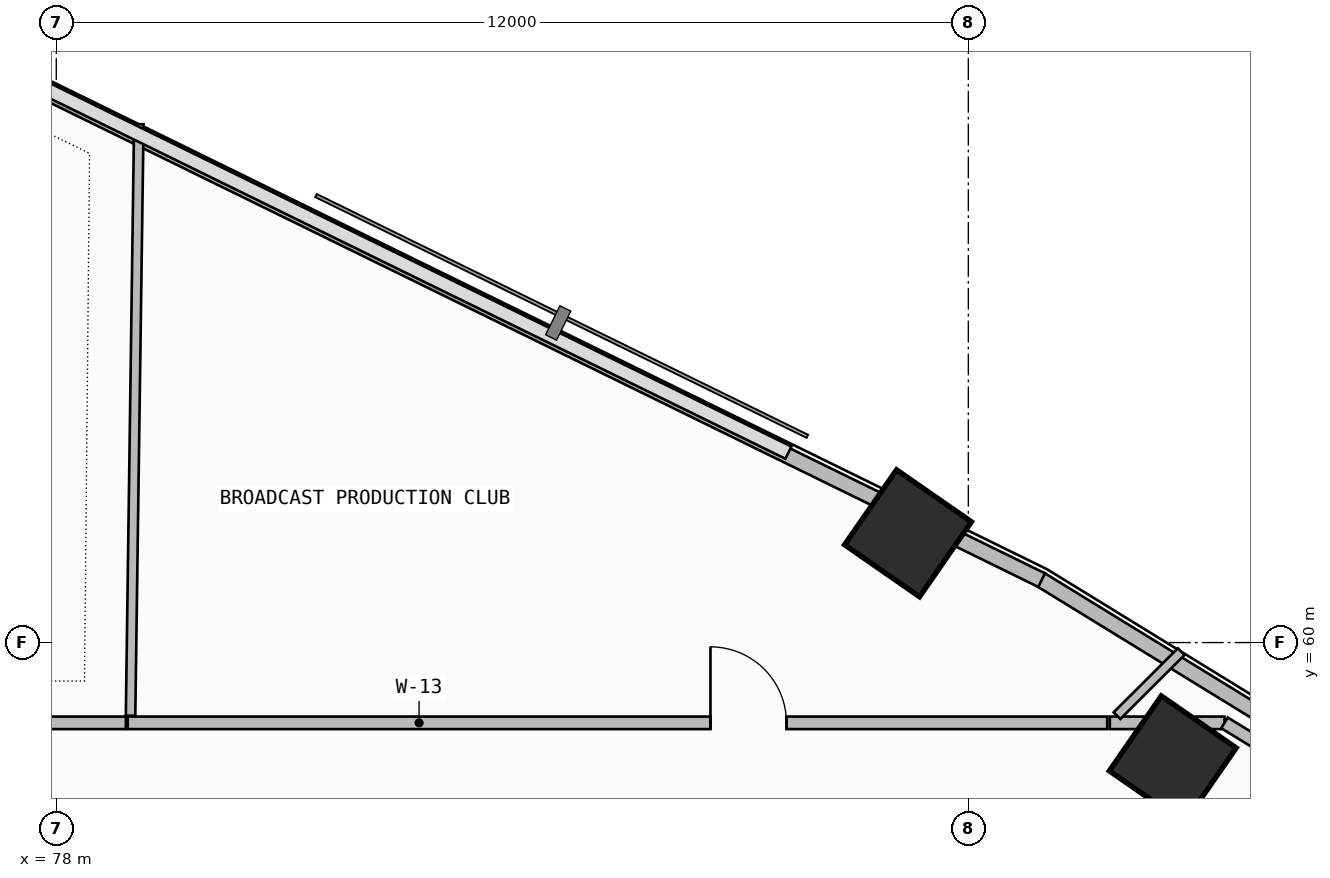
"""IFC4 building model, lengths in metres.
Left out: names, types, materials, properties, quantities, classifications, styles, units other than length and angle.
Written with IfcOpenShell. Run it as: python <this file> out.ifc"""

import sys

from ifc_helpers import new_model, si_unit, direction, frame, frame_2d, origin, origin_2d, place, context, subcontext, project, spatial, rectangle, extrude, element, fill, save


model = new_model("IFC4")
c1 = context("Model", 3, precision=1e-05, world=origin(), true_north=direction((0.0, 1.0)))
c2 = subcontext(c1, "Body", "Model", "MODEL_VIEW")
j1 = project(units=[si_unit("LENGTHUNIT", "METRE"), si_unit("PLANEANGLEUNIT", "RADIAN")], contexts=[c1])
p1 = place(None, origin())
s1 = spatial("IfcSite", under=j1, at=p1, CompositionType="ELEMENT")
p2 = place(p1, origin())
s2 = spatial("IfcBuilding", under=s1, at=p2, CompositionType="ELEMENT")
p3 = place(p2, frame((0.0, 0.0, 117.3)))
s3 = spatial("IfcBuildingStorey", under=s2, at=p3, CompositionType="ELEMENT", Elevation=117.3)
for number, where, z_axis, x_axis in (
    (1, (92.69, 58.463, 0.0), (0.0, 0.0, 1.0), (0.57, 0.822, 0.0)),
    (2, (89.207, 61.438, 0.0), (0.0, 0.0, 1.0), (0.57, 0.822, 0.0)),
):
    element("IfcColumn", number, at=place(p3, frame(where, z_axis=z_axis, x_axis=x_axis)), inside=s3, PredefinedType="COLUMN", context=c2, shape_type="SweptSolid", body=[
        extrude(rectangle(XDim=1.2, YDim=1.2, at=origin_2d()), origin(), (0.0, 0.0, 1.0), 3.6),
    ])
p4 = place(p3, frame((119.865, 43.07, 0.0), z_axis=(0.0, 0.0, 1.0), x_axis=(-0.852110824326, 0.52336138859, 0.0)))
e3 = element("IfcWall", 3, at=p4, inside=s3, PredefinedType="PARAPET", context=c2, shape_type="SweptSolid", body=[
    extrude(rectangle(XDim=33.932, YDim=0.2, at=frame_2d((16.966, 0.0))), origin(), (0.0, 0.0, 1.0), 1.15),
])
p5 = place(p3, frame((90.964, 60.822, 0.0), z_axis=(0.0, 0.0, 1.0), x_axis=(-0.898000468284, 0.439994498787, 0.0)))
e4 = element("IfcWall", 4, at=p5, inside=s3, PredefinedType="PARAPET", context=c2, shape_type="SweptSolid", body=[
    extrude(rectangle(XDim=1.423, YDim=0.2, at=frame_2d((0.712, 0.0))), origin(), (0.0, 0.0, 1.0), 1.15),
])
p6 = place(p3, frame((88.921, 61.823, 0.0), z_axis=(0.0, 0.0, 1.0), x_axis=(-0.897993533426, 0.440008652103, 0.0)))
e5 = element("IfcWall", 5, at=p6, inside=s3, PredefinedType="PARAPET", context=c2, shape_type="SweptSolid", body=[
    extrude(rectangle(XDim=26.864, YDim=0.2, at=frame_2d((13.432, 0.0))), origin(), (0.0, 0.0, 1.0), 1.15),
])
p7 = place(p3, frame((93.37, 58.944, 0.0), z_axis=(0.0, 0.0, 1.0), x_axis=(-1.0, 0.0, 0.0)))
e6 = element("IfcWall", 6, at=p7, inside=s3, PredefinedType="PARTITIONING", context=c2, shape_type="SweptSolid", body=[
    extrude(rectangle(XDim=1.509, YDim=0.165, at=frame_2d((0.754, 0.0))), origin(), (0.0, 0.0, 1.0), 2.725),
])
p8 = place(p3, frame((94.105, 58.493, 0.0), z_axis=(0.0, 0.0, 1.0), x_axis=(-0.851998403327, 0.523544382769, 0.0)))
e7 = element("IfcWall", 7, at=p8, inside=s3, PredefinedType="PARTITIONING", context=c2, shape_type="SweptSolid", body=[
    extrude(rectangle(XDim=0.862, YDim=0.165, at=frame_2d((0.431, 0.0))), origin(), (0.0, 0.0, 1.0), 3.34),
])
p9 = place(p3, frame((91.956, 59.039, 0.0), z_axis=(0.0, 0.0, 1.0), x_axis=(0.708129644878, 0.706082435729, 0.0)))
e8 = element("IfcWall", 8, at=p9, inside=s3, PredefinedType="PARTITIONING", context=c2, shape_type="SweptSolid", body=[
    extrude(rectangle(XDim=1.193, YDim=0.125, at=frame_2d((0.596, 0.0))), origin(), (0.0, 0.0, 1.0), 2.725),
])
p10 = place(p3, frame((91.828, 58.944, 0.0), z_axis=(0.0, 0.0, 1.0), x_axis=(-1.0, 0.0, 0.0)))
e9 = element("IfcWall", 9, at=p10, inside=s3, PredefinedType="PARTITIONING", context=c2, shape_type="SweptSolid", body=[
    extrude(rectangle(XDim=12.888, YDim=0.165, at=frame_2d((6.444, 0.0))), origin(), (0.0, 0.0, 1.0), 2.725),
])
p11 = place(p10, frame((4.221, 0.0, 0.0)))
e10 = element("IfcOpeningElement", 10, at=p11, cuts=e9, PredefinedType="OPENING", context=c2, shape_type="SweptSolid", body=[
    extrude(rectangle(XDim=1.0, YDim=2.2, at=frame_2d((0.5, 1.1))), frame((0.0, 0.093, 0.0), z_axis=(0.0, -1.0, 0.0), x_axis=(1.0, 0.0, 0.0)), (0.0, 0.0, 1.0), 0.185),
])
p12 = place(p3, frame((78.977, 59.039, 0.0), z_axis=(0.0, 0.0, 1.0), x_axis=(0.013992104015, 0.999902105721, 0.0)))
e11 = element("IfcWall", 11, at=p12, inside=s3, PredefinedType="PARTITIONING", context=c2, shape_type="SweptSolid", body=[
    extrude(rectangle(XDim=7.782, YDim=0.125, at=frame_2d((3.891, 0.0))), origin(), (0.0, 0.0, 1.0), 3.34),
])
p13 = place(p3, frame((78.916, 58.944, 0.0), z_axis=(0.0, 0.0, 1.0), x_axis=(-1.0, 0.0, 0.0)))
e12 = element("IfcWall", 12, at=p13, inside=s3, PredefinedType="PARTITIONING", context=c2, shape_type="SweptSolid", body=[
    extrude(rectangle(XDim=9.571, YDim=0.165, at=frame_2d((4.786, 0.0))), origin(), (0.0, 0.0, 1.0), 2.725),
])
p14 = place(p13, frame((3.06, 0.0, 0.0)))
e13 = element("IfcOpeningElement", 13, at=p14, cuts=e12, PredefinedType="OPENING", context=c2, shape_type="SweptSolid", body=[
    extrude(rectangle(XDim=1.0, YDim=2.2, at=frame_2d((0.5, 1.1))), frame((0.0, 0.093, 0.0), z_axis=(0.0, -1.0, 0.0), x_axis=(1.0, 0.0, 0.0)), (0.0, 0.0, 1.0), 0.185),
])
p15 = place(p11, frame((1.0, 0.0, 0.0), z_axis=(0.0, 0.0, 1.0), x_axis=(-1.0, 0.0, 0.0)))
e14 = element("IfcDoor", 14, at=p15, inside=s3, OperationType="SINGLE_SWING_LEFT", PredefinedType="DOOR", context=c2, shape_type="SweptSolid", body=[
    extrude(rectangle(XDim=1.0, YDim=2.2, at=frame_2d((0.5, 1.1))), frame((0.0, 0.025, 0.0), z_axis=(0.0, -1.0, 0.0), x_axis=(1.0, 0.0, 0.0)), (0.0, 0.0, 1.0), 0.05),
])
fill(e10, e14)
save(model, sys.argv[1])
